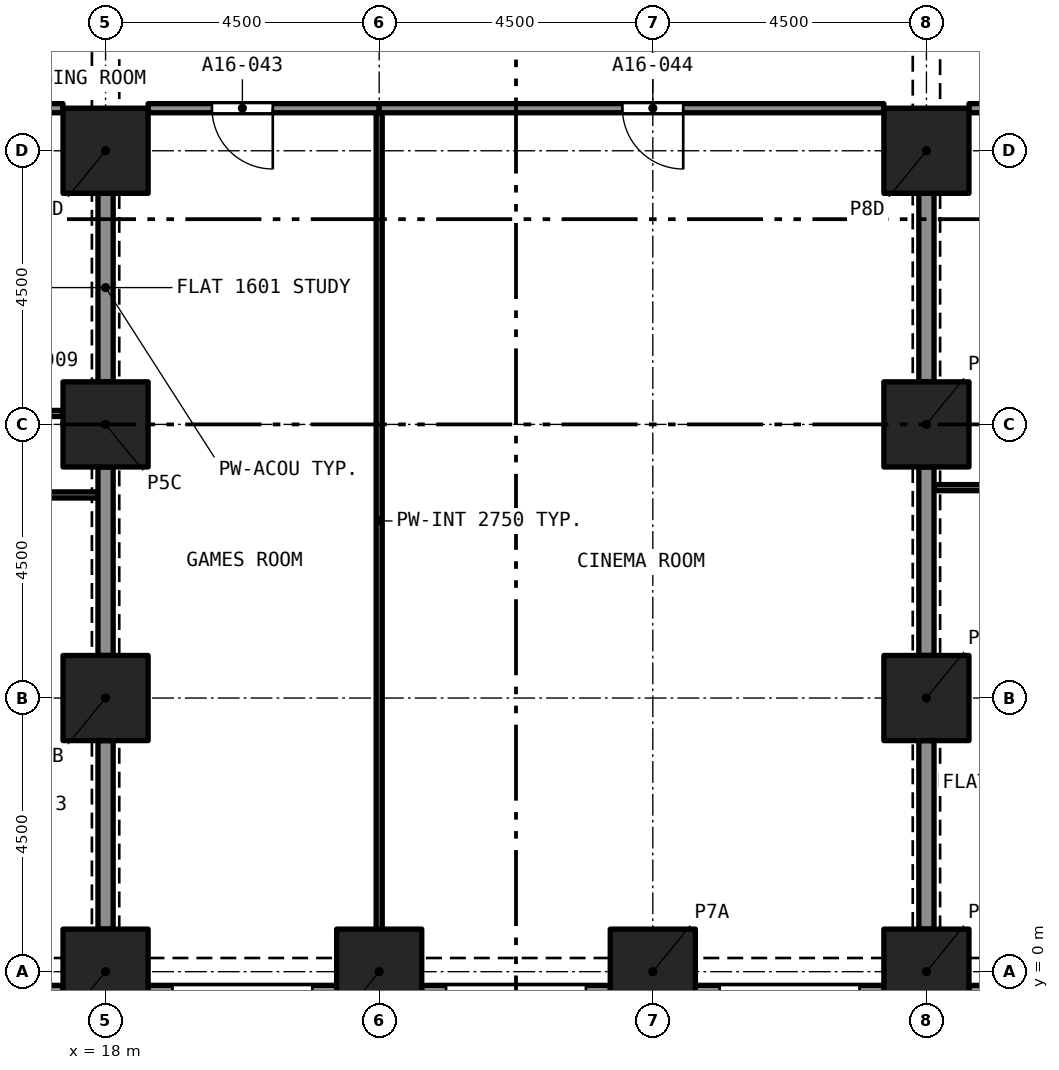
"""IFC4 building model, lengths in metres.
Left out: names, types, materials, properties, quantities, classifications, styles, units other than length and angle.
Written with IfcOpenShell. Run it as: python <this file> out.ifc"""

import sys

from ifc_helpers import new_model, si_unit, direction, frame, frame_2d, origin, origin_2d, place, context, subcontext, project, spatial, rectangle, extrude, element, fill, save


model = new_model("IFC4")
c1 = context("Model", 3, precision=1e-05, world=origin(), true_north=direction((0.0, 1.0)))
c2 = subcontext(c1, "Body", "Model", "MODEL_VIEW")
j1 = project(units=[si_unit("LENGTHUNIT", "METRE"), si_unit("PLANEANGLEUNIT", "RADIAN")], contexts=[c1])
p1 = place(None, origin())
s1 = spatial("IfcSite", under=j1, at=p1, CompositionType="ELEMENT")
p2 = place(p1, origin())
s2 = spatial("IfcBuilding", under=s1, at=p2, CompositionType="ELEMENT")
p3 = place(p2, frame((0.0, 0.0, 62.4)))
s3 = spatial("IfcBuildingStorey", under=s2, at=p3, CompositionType="ELEMENT", Elevation=62.4)
for number, where, z_axis, x_axis in (
    (1, (18.0, 0.0, 0.0), (0.0, 0.0, 1.0), (1.0, 0.0, 0.0)),
    (2, (22.5, 0.0, 0.0), (0.0, 0.0, 1.0), (1.0, 0.0, 0.0)),
    (3, (27.0, 0.0, 0.0), (0.0, 0.0, 1.0), (1.0, 0.0, 0.0)),
    (4, (31.5, 0.0, 0.0), (0.0, 0.0, 1.0), (1.0, 0.0, 0.0)),
    (5, (18.0, 4.5, 0.0), (0.0, 0.0, 1.0), (1.0, 0.0, 0.0)),
    (6, (31.5, 4.5, 0.0), (0.0, 0.0, 1.0), (1.0, 0.0, 0.0)),
    (7, (18.0, 9.0, 0.0), (0.0, 0.0, 1.0), (1.0, 0.0, 0.0)),
    (8, (31.5, 9.0, 0.0), (0.0, 0.0, 1.0), (1.0, 0.0, 0.0)),
    (9, (18.0, 13.5, 0.0), (0.0, 0.0, 1.0), (1.0, 0.0, 0.0)),
    (10, (31.5, 13.5, 0.0), (0.0, 0.0, 1.0), (1.0, 0.0, 0.0)),
):
    element("IfcColumn", number, at=place(p3, frame(where, z_axis=z_axis, x_axis=x_axis)), inside=s3, PredefinedType="COLUMN", context=c2, shape_type="SweptSolid", body=[
        extrude(rectangle(XDim=1.4, YDim=1.4, at=origin_2d()), origin(), (0.0, 0.0, 1.0), 3.2),
    ])
p4 = place(p3, frame((17.3, -0.375, 0.0), z_axis=(0.0, 0.0, 1.0), x_axis=(-1.0, 0.0, 0.0)))
e11 = element("IfcWall", 11, at=p4, inside=s3, PredefinedType="SOLIDWALL", context=c2, shape_type="SweptSolid", body=[
    extrude(rectangle(XDim=3.1, YDim=0.3, at=frame_2d((1.55, 0.0))), origin(), (0.0, 0.0, 1.0), 3.2),
])
p5 = place(p4, frame((0.4, 0.0, 0.45)))
e12 = element("IfcOpeningElement", 12, at=p5, cuts=e11, PredefinedType="OPENING", context=c2, shape_type="SweptSolid", body=[
    extrude(rectangle(XDim=2.3, YDim=1.95, at=frame_2d((1.15, 0.975))), frame((0.0, 0.16, 0.0), z_axis=(0.0, -1.0, 0.0), x_axis=(1.0, 0.0, 0.0)), (0.0, 0.0, 1.0), 0.32),
])
p6 = place(p3, frame((21.8, -0.375, 0.0), z_axis=(0.0, 0.0, 1.0), x_axis=(-1.0, 0.0, 0.0)))
e13 = element("IfcWall", 13, at=p6, inside=s3, PredefinedType="SOLIDWALL", context=c2, shape_type="SweptSolid", body=[
    extrude(rectangle(XDim=3.1, YDim=0.3, at=frame_2d((1.55, 0.0))), origin(), (0.0, 0.0, 1.0), 3.2),
])
p7 = place(p6, frame((0.4, 0.0, 0.45)))
e14 = element("IfcOpeningElement", 14, at=p7, cuts=e13, PredefinedType="OPENING", context=c2, shape_type="SweptSolid", body=[
    extrude(rectangle(XDim=2.3, YDim=1.95, at=frame_2d((1.15, 0.975))), frame((0.0, 0.16, 0.0), z_axis=(0.0, -1.0, 0.0), x_axis=(1.0, 0.0, 0.0)), (0.0, 0.0, 1.0), 0.32),
])
p8 = place(p3, frame((26.3, -0.375, 0.0), z_axis=(0.0, 0.0, 1.0), x_axis=(-1.0, 0.0, 0.0)))
e15 = element("IfcWall", 15, at=p8, inside=s3, PredefinedType="SOLIDWALL", context=c2, shape_type="SweptSolid", body=[
    extrude(rectangle(XDim=3.1, YDim=0.3, at=frame_2d((1.55, 0.0))), origin(), (0.0, 0.0, 1.0), 3.2),
])
p9 = place(p8, frame((0.4, 0.0, 0.45)))
e16 = element("IfcOpeningElement", 16, at=p9, cuts=e15, PredefinedType="OPENING", context=c2, shape_type="SweptSolid", body=[
    extrude(rectangle(XDim=2.3, YDim=1.95, at=frame_2d((1.15, 0.975))), frame((0.0, 0.16, 0.0), z_axis=(0.0, -1.0, 0.0), x_axis=(1.0, 0.0, 0.0)), (0.0, 0.0, 1.0), 0.32),
])
p10 = place(p3, frame((30.8, -0.375, 0.0), z_axis=(0.0, 0.0, 1.0), x_axis=(-1.0, 0.0, 0.0)))
e17 = element("IfcWall", 17, at=p10, inside=s3, PredefinedType="SOLIDWALL", context=c2, shape_type="SweptSolid", body=[
    extrude(rectangle(XDim=3.1, YDim=0.3, at=frame_2d((1.55, 0.0))), origin(), (0.0, 0.0, 1.0), 3.2),
])
p11 = place(p10, frame((0.4, 0.0, 0.45)))
e18 = element("IfcOpeningElement", 18, at=p11, cuts=e17, PredefinedType="OPENING", context=c2, shape_type="SweptSolid", body=[
    extrude(rectangle(XDim=2.3, YDim=1.95, at=frame_2d((1.15, 0.975))), frame((0.0, 0.16, 0.0), z_axis=(0.0, -1.0, 0.0), x_axis=(1.0, 0.0, 0.0)), (0.0, 0.0, 1.0), 0.32),
])
p12 = place(p3, frame((35.3, -0.375, 0.0), z_axis=(0.0, 0.0, 1.0), x_axis=(-1.0, 0.0, 0.0)))
e19 = element("IfcWall", 19, at=p12, inside=s3, PredefinedType="SOLIDWALL", context=c2, shape_type="SweptSolid", body=[
    extrude(rectangle(XDim=3.1, YDim=0.3, at=frame_2d((1.55, 0.0))), origin(), (0.0, 0.0, 1.0), 3.2),
])
p13 = place(p12, frame((0.4, 0.0, 0.45)))
e20 = element("IfcOpeningElement", 20, at=p13, cuts=e19, PredefinedType="OPENING", context=c2, shape_type="SweptSolid", body=[
    extrude(rectangle(XDim=2.3, YDim=1.95, at=frame_2d((1.15, 0.975))), frame((0.0, 0.16, 0.0), z_axis=(0.0, -1.0, 0.0), x_axis=(1.0, 0.0, 0.0)), (0.0, 0.0, 1.0), 0.32),
])
p14 = place(p3, frame((8.55, 14.2, 0.0), z_axis=(0.0, 0.0, 1.0), x_axis=(1.0, 0.0, 0.0)))
e21 = element("IfcWall", 21, at=p14, inside=s3, PredefinedType="PARTITIONING", context=c2, shape_type="SweptSolid", body=[
    extrude(rectangle(XDim=8.75, YDim=0.15, at=frame_2d((4.375, 0.0))), origin(), (0.0, 0.0, 1.0), 2.9),
])
p15 = place(p3, frame((17.875, 7.84, 0.0), z_axis=(0.0, 0.0, 1.0), x_axis=(-1.0, 0.0, 0.0)))
e22 = element("IfcWall", 22, at=p15, inside=s3, PredefinedType="PARTITIONING", context=c2, shape_type="SweptSolid", body=[
    extrude(rectangle(XDim=4.375, YDim=0.1, at=frame_2d((2.188, 0.0))), origin(), (0.0, 0.0, 1.0), 2.9),
])
p16 = place(p15, frame((1.675, 0.0, 0.0)))
e23 = element("IfcOpeningElement", 23, at=p16, cuts=e22, PredefinedType="OPENING", context=c2, shape_type="SweptSolid", body=[
    extrude(rectangle(XDim=0.9, YDim=2.1, at=frame_2d((0.45, 1.05))), frame((0.0, 0.06, 0.0), z_axis=(0.0, -1.0, 0.0), x_axis=(1.0, 0.0, 0.0)), (0.0, 0.0, 1.0), 0.12),
])
for number, where, z_axis, x_axis in (
    (24, (18.0, 5.2, 0.0), (0.0, 0.0, 1.0), (0.0, 1.0, 0.0)),
    (25, (18.0, 0.7, 0.0), (0.0, 0.0, 1.0), (0.0, 1.0, 0.0)),
):
    element("IfcWall", number, at=place(p3, frame(where, z_axis=z_axis, x_axis=x_axis)), inside=s3, PredefinedType="PARTITIONING", context=c2, shape_type="SweptSolid", body=[
        extrude(rectangle(XDim=3.1, YDim=0.25, at=frame_2d((1.55, 0.0))), origin(), (0.0, 0.0, 1.0), 2.38),
    ])
p17 = place(p3, frame((14.771, 9.18, 0.0), z_axis=(0.0, 0.0, 1.0), x_axis=(1.0, 0.0, 0.0)))
e26 = element("IfcWall", 26, at=p17, inside=s3, PredefinedType="PARTITIONING", context=c2, shape_type="SweptSolid", body=[
    extrude(rectangle(XDim=2.529, YDim=0.1, at=frame_2d((1.265, 0.0))), origin(), (0.0, 0.0, 1.0), 2.9),
])
p18 = place(p17, frame((1.165, 0.0, 0.0)))
e27 = element("IfcOpeningElement", 27, at=p18, cuts=e26, PredefinedType="OPENING", context=c2, shape_type="SweptSolid", body=[
    extrude(rectangle(XDim=0.9, YDim=2.1, at=frame_2d((0.45, 1.05))), frame((0.0, 0.06, 0.0), z_axis=(0.0, -1.0, 0.0), x_axis=(1.0, 0.0, 0.0)), (0.0, 0.0, 1.0), 0.12),
])
p19 = place(p3, frame((18.0, 9.7, 0.0), z_axis=(0.0, 0.0, 1.0), x_axis=(0.0, 1.0, 0.0)))
e28 = element("IfcWall", 28, at=p19, inside=s3, PredefinedType="PARTITIONING", context=c2, shape_type="SweptSolid", body=[
    extrude(rectangle(XDim=3.1, YDim=0.25, at=frame_2d((1.55, 0.0))), origin(), (0.0, 0.0, 1.0), 2.38),
])
p20 = place(p3, frame((36.0, 7.96, 0.0), z_axis=(0.0, 0.0, 1.0), x_axis=(-1.0, 0.0, 0.0)))
e29 = element("IfcWall", 29, at=p20, inside=s3, PredefinedType="PARTITIONING", context=c2, shape_type="SweptSolid", body=[
    extrude(rectangle(XDim=4.375, YDim=0.1, at=frame_2d((2.188, 0.0))), origin(), (0.0, 0.0, 1.0), 2.9),
])
p21 = place(p20, frame((1.75, 0.0, 0.0)))
e30 = element("IfcOpeningElement", 30, at=p21, cuts=e29, PredefinedType="OPENING", context=c2, shape_type="SweptSolid", body=[
    extrude(rectangle(XDim=1.0, YDim=2.1, at=frame_2d((0.5, 1.05))), frame((0.0, 0.06, 0.0), z_axis=(0.0, -1.0, 0.0), x_axis=(1.0, 0.0, 0.0)), (0.0, 0.0, 1.0), 0.12),
])
p22 = place(p3, frame((31.5, 9.7, 0.0), z_axis=(0.0, 0.0, 1.0), x_axis=(0.0, 1.0, 0.0)))
e31 = element("IfcWall", 31, at=p22, inside=s3, PredefinedType="PARTITIONING", context=c2, shape_type="SweptSolid", body=[
    extrude(rectangle(XDim=3.1, YDim=0.25, at=frame_2d((1.55, 0.0))), origin(), (0.0, 0.0, 1.0), 2.38),
])
p23 = place(p3, frame((34.425, 14.2, 0.0), z_axis=(0.0, 0.0, 1.0), x_axis=(-1.0, 0.0, 0.0)))
e32 = element("IfcWall", 32, at=p23, inside=s3, PredefinedType="PARTITIONING", context=c2, shape_type="SweptSolid", body=[
    extrude(rectangle(XDim=2.225, YDim=0.15, at=frame_2d((1.113, 0.0))), origin(), (0.0, 0.0, 1.0), 2.9),
])
p24 = place(p23, frame((0.175, 0.0, 0.0)))
e33 = element("IfcOpeningElement", 33, at=p24, cuts=e32, PredefinedType="OPENING", context=c2, shape_type="SweptSolid", body=[
    extrude(rectangle(XDim=1.0, YDim=2.1, at=frame_2d((0.5, 1.05))), frame((0.0, 0.085, 0.0), z_axis=(0.0, -1.0, 0.0), x_axis=(1.0, 0.0, 0.0)), (0.0, 0.0, 1.0), 0.17),
])
for number, where, z_axis, x_axis in (
    (34, (31.5, 0.7, 0.0), (0.0, 0.0, 1.0), (0.0, 1.0, 0.0)),
    (35, (31.5, 5.2, 0.0), (0.0, 0.0, 1.0), (0.0, 1.0, 0.0)),
):
    element("IfcWall", number, at=place(p3, frame(where, z_axis=z_axis, x_axis=x_axis)), inside=s3, PredefinedType="PARTITIONING", context=c2, shape_type="SweptSolid", body=[
        extrude(rectangle(XDim=3.1, YDim=0.25, at=frame_2d((1.55, 0.0))), origin(), (0.0, 0.0, 1.0), 2.38),
    ])
p25 = place(p3, frame((22.5, 0.7, 0.0), z_axis=(0.0, 0.0, 1.0), x_axis=(0.0, 1.0, 0.0)))
e36 = element("IfcWall", 36, at=p25, inside=s3, PredefinedType="PARTITIONING", context=c2, shape_type="SweptSolid", body=[
    extrude(rectangle(XDim=13.425, YDim=0.1, at=frame_2d((6.712, 0.0))), origin(), (0.0, 0.0, 1.0), 2.75),
])
p26 = place(p3, frame((22.5, 14.2, 0.0), z_axis=(0.0, 0.0, 1.0), x_axis=(-1.0, 0.0, 0.0)))
e37 = element("IfcWall", 37, at=p26, inside=s3, PredefinedType="PARTITIONING", context=c2, shape_type="SweptSolid", body=[
    extrude(rectangle(XDim=3.8, YDim=0.15, at=frame_2d((1.9, 0.0))), origin(), (0.0, 0.0, 1.0), 2.75),
])
p27 = place(p26, frame((1.75, 0.0, 0.0)))
e38 = element("IfcOpeningElement", 38, at=p27, cuts=e37, PredefinedType="OPENING", context=c2, shape_type="SweptSolid", body=[
    extrude(rectangle(XDim=1.0, YDim=2.1, at=frame_2d((0.5, 1.05))), frame((0.0, 0.085, 0.0), z_axis=(0.0, -1.0, 0.0), x_axis=(1.0, 0.0, 0.0)), (0.0, 0.0, 1.0), 0.17),
])
p28 = place(p3, frame((30.8, 14.2, 0.0), z_axis=(0.0, 0.0, 1.0), x_axis=(-1.0, 0.0, 0.0)))
e39 = element("IfcWall", 39, at=p28, inside=s3, PredefinedType="PARTITIONING", context=c2, shape_type="SweptSolid", body=[
    extrude(rectangle(XDim=8.3, YDim=0.15, at=frame_2d((4.15, 0.0))), origin(), (0.0, 0.0, 1.0), 2.75),
])
p29 = place(p28, frame((3.3, 0.0, 0.0)))
e40 = element("IfcOpeningElement", 40, at=p29, cuts=e39, PredefinedType="OPENING", context=c2, shape_type="SweptSolid", body=[
    extrude(rectangle(XDim=1.0, YDim=2.1, at=frame_2d((0.5, 1.05))), frame((0.0, 0.085, 0.0), z_axis=(0.0, -1.0, 0.0), x_axis=(1.0, 0.0, 0.0)), (0.0, 0.0, 1.0), 0.17),
])
p30 = place(p27, origin())
e41 = element("IfcDoor", 41, at=p30, inside=s3, OperationType="SINGLE_SWING_RIGHT", PredefinedType="DOOR", context=c2, shape_type="SweptSolid", body=[
    extrude(rectangle(XDim=1.0, YDim=2.1, at=frame_2d((0.5, 1.05))), frame((0.0, 0.025, 0.0), z_axis=(0.0, -1.0, 0.0), x_axis=(1.0, 0.0, 0.0)), (0.0, 0.0, 1.0), 0.05),
])
fill(e38, e41)
p31 = place(p29, origin())
e42 = element("IfcDoor", 42, at=p31, inside=s3, OperationType="SINGLE_SWING_LEFT", PredefinedType="DOOR", context=c2, shape_type="SweptSolid", body=[
    extrude(rectangle(XDim=1.0, YDim=2.1, at=frame_2d((0.5, 1.05))), frame((0.0, 0.025, 0.0), z_axis=(0.0, -1.0, 0.0), x_axis=(1.0, 0.0, 0.0)), (0.0, 0.0, 1.0), 0.05),
])
fill(e40, e42)
save(model, sys.argv[1])
